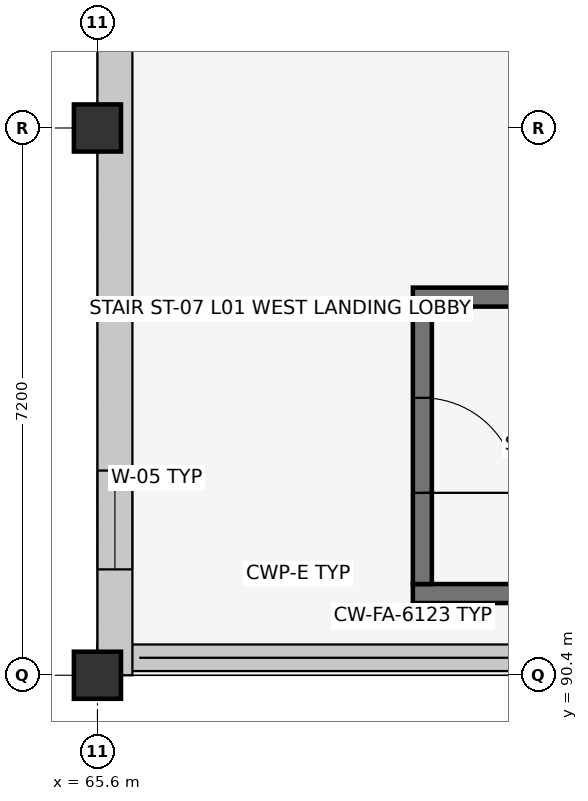
"""IFC4 building model, lengths in metres.
Left out: names, types, materials, properties, quantities, classifications, styles, units other than length and angle.
Written with IfcOpenShell. Run it as: python <this file> out.ifc"""

import sys

from ifc_helpers import new_model, si_unit, direction, frame, frame_2d, origin, origin_2d, place, context, subcontext, project, spatial, rectangle, extrude, element, fill, save


model = new_model("IFC4")
c1 = context("Model", 3, precision=1e-05, world=origin(), true_north=direction((0.0, 1.0)))
c2 = subcontext(c1, "Body", "Model", "MODEL_VIEW")
j1 = project(units=[si_unit("LENGTHUNIT", "METRE"), si_unit("PLANEANGLEUNIT", "RADIAN")], contexts=[c1])
p1 = place(None, origin())
s1 = spatial("IfcSite", under=j1, at=p1, CompositionType="ELEMENT")
p2 = place(p1, origin())
s2 = spatial("IfcBuilding", under=s1, at=p2, CompositionType="ELEMENT")
p3 = place(p2, frame((0.0, 0.0, 5.4)))
s3 = spatial("IfcBuildingStorey", under=s2, at=p3, CompositionType="ELEMENT", Elevation=5.4)
for number, where, z_axis, x_axis in (
    (1, (65.6, 90.4, 0.0), (0.0, 0.0, 1.0), (1.0, 0.0, 0.0)),
    (2, (65.6, 97.6, 0.0), (0.0, 0.0, 1.0), (1.0, 0.0, 0.0)),
):
    element("IfcColumn", number, at=place(p3, frame(where, z_axis=z_axis, x_axis=x_axis)), inside=s3, PredefinedType="COLUMN", context=c2, shape_type="SweptSolid", body=[
        extrude(rectangle(XDim=0.62, YDim=0.62, at=origin_2d()), origin(), (0.0, 0.0, 1.0), 4.2),
    ])
p4 = place(p3, frame((108.8, 90.63, 0.0), z_axis=(0.0, 0.0, 1.0), x_axis=(-1.0, 0.0, 0.0)))
e3 = element("IfcWall", 3, at=p4, inside=s3, PredefinedType="SOLIDWALL", context=c2, shape_type="SweptSolid", body=[
    extrude(rectangle(XDim=43.2, YDim=0.35, at=frame_2d((21.6, 0.0))), origin(), (0.0, 0.0, 1.0), 0.85),
])
p5 = place(p3, frame((65.83, 90.4, 0.0), z_axis=(0.0, 0.0, 1.0), x_axis=(0.0, 1.0, 0.0)))
e4 = element("IfcWall", 4, at=p5, inside=s3, PredefinedType="SOLIDWALL", context=c2, shape_type="SweptSolid", body=[
    extrude(rectangle(XDim=28.6, YDim=0.46, at=frame_2d((14.3, 0.0))), origin(), (0.0, 0.0, 1.0), 3.175),
])
p6 = place(p5, frame((1.393, 0.0, 0.9)))
e5 = element("IfcOpeningElement", 5, at=p6, cuts=e4, PredefinedType="OPENING", context=c2, shape_type="SweptSolid", body=[
    extrude(rectangle(XDim=1.3, YDim=1.35, at=frame_2d((0.65, 0.675))), frame((0.0, 0.242, 0.0), z_axis=(0.0, -1.0, 0.0), x_axis=(1.0, 0.0, 0.0)), (0.0, 0.0, 1.0), 0.484),
])
p7 = place(p5, frame((17.811, 0.0, 0.9)))
e6 = element("IfcOpeningElement", 6, at=p7, cuts=e4, PredefinedType="OPENING", context=c2, shape_type="SweptSolid", body=[
    extrude(rectangle(XDim=1.15, YDim=1.45, at=frame_2d((0.575, 0.725))), frame((0.0, 0.242, 0.0), z_axis=(0.0, -1.0, 0.0), x_axis=(1.0, 0.0, 0.0)), (0.0, 0.0, 1.0), 0.484),
])
p8 = place(p5, frame((25.882, 0.0, 0.9)))
e7 = element("IfcOpeningElement", 7, at=p8, cuts=e4, PredefinedType="OPENING", context=c2, shape_type="SweptSolid", body=[
    extrude(rectangle(XDim=1.35, YDim=1.45, at=frame_2d((0.675, 0.725))), frame((0.0, 0.242, 0.0), z_axis=(0.0, -1.0, 0.0), x_axis=(1.0, 0.0, 0.0)), (0.0, 0.0, 1.0), 0.484),
])
p9 = place(p3, frame((69.75, 91.475, 0.0), z_axis=(0.0, 0.0, 1.0), x_axis=(1.0, 0.0, 0.0)))
e8 = element("IfcWall", 8, at=p9, inside=s3, PredefinedType="SHEAR", context=c2, shape_type="SweptSolid", body=[
    extrude(rectangle(XDim=9.57, YDim=0.25, at=frame_2d((4.785, 0.0))), origin(), (0.0, 0.0, 1.0), 3.92),
])
p10 = place(p3, frame((78.75, 95.375, 0.0), z_axis=(0.0, 0.0, 1.0), x_axis=(-1.0, 0.0, 0.0)))
e9 = element("IfcWall", 9, at=p10, inside=s3, PredefinedType="SHEAR", context=c2, shape_type="SweptSolid", body=[
    extrude(rectangle(XDim=9.0, YDim=0.25, at=frame_2d((4.5, 0.0))), origin(), (0.0, 0.0, 1.0), 3.92),
])
p11 = place(p3, frame((69.875, 95.25, 0.0), z_axis=(0.0, 0.0, 1.0), x_axis=(0.0, -1.0, 0.0)))
e10 = element("IfcWall", 10, at=p11, inside=s3, PredefinedType="SHEAR", context=c2, shape_type="SweptSolid", body=[
    extrude(rectangle(XDim=3.65, YDim=0.25, at=frame_2d((1.825, 0.0))), origin(), (0.0, 0.0, 1.0), 3.92),
])
p12 = place(p11, frame((1.2, 0.0, 0.0)))
e11 = element("IfcOpeningElement", 11, at=p12, cuts=e10, PredefinedType="OPENING", context=c2, shape_type="SweptSolid", body=[
    extrude(rectangle(XDim=1.25, YDim=2.15, at=frame_2d((0.625, 1.075))), frame((0.0, 0.137, 0.0), z_axis=(0.0, -1.0, 0.0), x_axis=(1.0, 0.0, 0.0)), (0.0, 0.0, 1.0), 0.274),
])
p13 = place(p6, origin())
e12 = element("IfcWindow", 12, at=p13, inside=s3, PartitioningType="SINGLE_PANEL", PredefinedType="WINDOW", context=c2, shape_type="SweptSolid", body=[
    extrude(rectangle(XDim=1.3, YDim=1.35, at=frame_2d((0.65, 0.675))), frame((0.0, 0.03, 0.0), z_axis=(0.0, -1.0, 0.0), x_axis=(1.0, 0.0, 0.0)), (0.0, 0.0, 1.0), 0.06),
])
fill(e5, e12)
p14 = place(p12, origin())
e13 = element("IfcDoor", 13, at=p14, inside=s3, OperationType="SINGLE_SWING_RIGHT", PredefinedType="DOOR", context=c2, shape_type="SweptSolid", body=[
    extrude(rectangle(XDim=1.25, YDim=2.15, at=frame_2d((0.625, 1.075))), frame((0.0, 0.025, 0.0), z_axis=(0.0, -1.0, 0.0), x_axis=(1.0, 0.0, 0.0)), (0.0, 0.0, 1.0), 0.05),
])
fill(e11, e13)
save(model, sys.argv[1])
